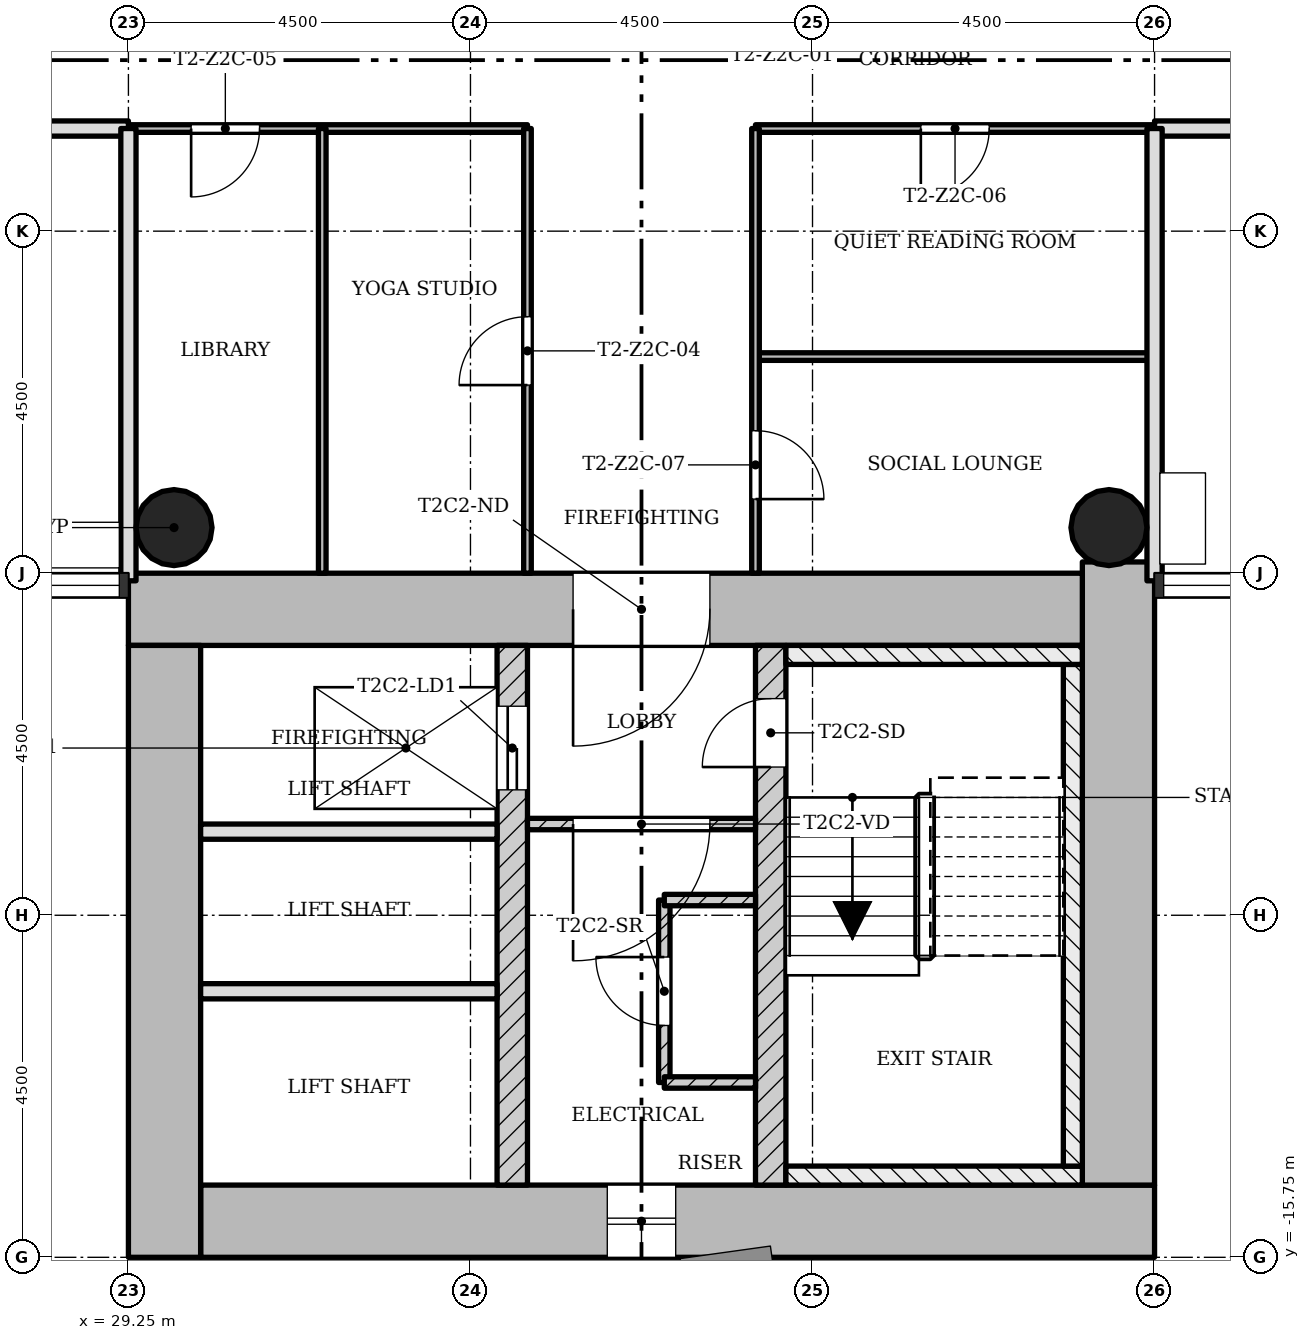
"""IFC4 building model, lengths in metres.
Left out: names, types, materials, properties, quantities, classifications, styles, units other than length and angle.
Written with IfcOpenShell. Run it as: python <this file> out.ifc"""

import sys

from ifc_helpers import new_model, si_unit, direction, frame, frame_2d, origin, origin_2d, place, context, subcontext, project, spatial, rectangle, hollow_circle, extrude, element, fill, save


model = new_model("IFC4")
c1 = context("Model", 3, precision=1e-05, world=origin(), true_north=direction((0.0, 1.0)))
c2 = subcontext(c1, "Body", "Model", "MODEL_VIEW")
j1 = project(units=[si_unit("LENGTHUNIT", "METRE"), si_unit("PLANEANGLEUNIT", "RADIAN")], contexts=[c1])
p1 = place(None, origin())
s1 = spatial("IfcSite", under=j1, at=p1, CompositionType="ELEMENT")
p2 = place(p1, origin())
s2 = spatial("IfcBuilding", under=s1, at=p2, CompositionType="ELEMENT")
p3 = place(p2, frame((0.0, 0.0, 93.6)))
s3 = spatial("IfcBuildingStorey", under=s2, at=p3, CompositionType="ELEMENT", Elevation=93.6)
p4 = place(p3, frame((30.2, -15.275, 0.0), z_axis=(0.0, 0.0, 1.0), x_axis=(1.0, 0.0, 0.0)))
e1 = element("IfcWall", 1, at=p4, inside=s3, PredefinedType="SHEAR", context=c2, shape_type="SweptSolid", body=[
    extrude(rectangle(XDim=12.55, YDim=0.95, at=frame_2d((6.275, 0.0))), origin(), (0.0, 0.0, 1.0), 3.4),
])
p5 = place(p4, frame((5.35, 0.0, 0.45)))
e2 = element("IfcOpeningElement", 2, at=p5, cuts=e1, PredefinedType="OPENING", context=c2, shape_type="SweptSolid", body=[
    extrude(rectangle(XDim=0.9, YDim=2.4, at=frame_2d((0.45, 1.2))), frame((0.0, 0.485, 0.0), z_axis=(0.0, -1.0, 0.0), x_axis=(1.0, 0.0, 0.0)), (0.0, 0.0, 1.0), 0.97),
])
p6 = place(p3, frame((42.275, -14.8, 0.0), z_axis=(0.0, 0.0, 1.0), x_axis=(0.0, 1.0, 0.0)))
e3 = element("IfcWall", 3, at=p6, inside=s3, PredefinedType="SHEAR", context=c2, shape_type="SweptSolid", body=[
    extrude(rectangle(XDim=8.198, YDim=0.95, at=frame_2d((4.099, 0.0))), origin(), (0.0, 0.0, 1.0), 3.4),
])
p7 = place(p3, frame((41.8, -7.225, 0.0), z_axis=(0.0, 0.0, 1.0), x_axis=(-1.0, 0.0, 0.0)))
e4 = element("IfcWall", 4, at=p7, inside=s3, PredefinedType="SHEAR", context=c2, shape_type="SweptSolid", body=[
    extrude(rectangle(XDim=12.55, YDim=0.95, at=frame_2d((6.275, 0.0))), origin(), (0.0, 0.0, 1.0), 3.4),
])
p8 = place(p7, frame((4.9, 0.0, 0.0)))
e5 = element("IfcOpeningElement", 5, at=p8, cuts=e4, PredefinedType="OPENING", context=c2, shape_type="SweptSolid", body=[
    extrude(rectangle(XDim=1.8, YDim=2.1, at=frame_2d((0.9, 1.05))), frame((0.0, 0.485, 0.0), z_axis=(0.0, -1.0, 0.0), x_axis=(1.0, 0.0, 0.0)), (0.0, 0.0, 1.0), 0.97),
])
p9 = place(p3, frame((29.725, -7.7, 0.0), z_axis=(0.0, 0.0, 1.0), x_axis=(0.0, -1.0, 0.0)))
e6 = element("IfcWall", 6, at=p9, inside=s3, PredefinedType="SHEAR", context=c2, shape_type="SweptSolid", body=[
    extrude(rectangle(XDim=8.05, YDim=0.95, at=frame_2d((4.025, 0.0))), origin(), (0.0, 0.0, 1.0), 3.4),
])
p10 = place(p3, frame((34.3, -14.8, 0.0), z_axis=(0.0, 0.0, 1.0), x_axis=(0.0, 1.0, 0.0)))
e7 = element("IfcWall", 7, at=p10, inside=s3, PredefinedType="SHEAR", context=c2, shape_type="SweptSolid", body=[
    extrude(rectangle(XDim=7.1, YDim=0.4, at=frame_2d((3.55, 0.0))), origin(), (0.0, 0.0, 1.0), 3.4),
])
p11 = place(p10, frame((5.2, 0.0, 0.0)))
e8 = element("IfcOpeningElement", 8, at=p11, cuts=e7, PredefinedType="OPENING", context=c2, shape_type="SweptSolid", body=[
    extrude(rectangle(XDim=1.1, YDim=2.1, at=frame_2d((0.55, 1.05))), frame((0.0, 0.21, 0.0), z_axis=(0.0, -1.0, 0.0), x_axis=(1.0, 0.0, 0.0)), (0.0, 0.0, 1.0), 0.42),
])
p12 = place(p3, frame((37.7, -14.8, 0.0), z_axis=(0.0, 0.0, 1.0), x_axis=(0.0, 1.0, 0.0)))
e9 = element("IfcWall", 9, at=p12, inside=s3, PredefinedType="SHEAR", context=c2, shape_type="SweptSolid", body=[
    extrude(rectangle(XDim=7.1, YDim=0.4, at=frame_2d((3.55, 0.0))), origin(), (0.0, 0.0, 1.0), 3.4),
])
p13 = place(p12, frame((5.5, 0.0, 0.0)))
e10 = element("IfcOpeningElement", 10, at=p13, cuts=e9, PredefinedType="OPENING", context=c2, shape_type="SweptSolid", body=[
    extrude(rectangle(XDim=0.9, YDim=2.1, at=frame_2d((0.45, 1.05))), frame((0.0, 0.21, 0.0), z_axis=(0.0, -1.0, 0.0), x_axis=(1.0, 0.0, 0.0)), (0.0, 0.0, 1.0), 0.42),
])
for number, where, z_axis, x_axis in (
    (11, (42.15, -6.15, 0.0), (0.0, 0.0, 1.0), (1.0, 0.0, 0.0)),
    (12, (29.85, -6.15, 0.0), (0.0, 0.0, 1.0), (1.0, 0.0, 0.0)),
):
    element("IfcColumn", number, at=place(p3, frame(where, z_axis=z_axis, x_axis=x_axis)), inside=s3, PredefinedType="COLUMN", context=c2, shape_type="SweptSolid", body=[
        extrude(hollow_circle(Radius=0.5, WallThickness=0.036, at=origin_2d()), origin(), (0.0, 0.0, 1.0), 3.4),
    ])
p14 = place(p3, frame((34.5, -10.05, 0.0), z_axis=(0.0, 0.0, 1.0), x_axis=(1.0, 0.0, 0.0)))
e13 = element("IfcWall", 13, at=p14, inside=s3, PredefinedType="PARTITIONING", context=c2, shape_type="SweptSolid", body=[
    extrude(rectangle(XDim=3.0, YDim=0.15, at=frame_2d((1.5, 0.0))), origin(), (0.0, 0.0, 1.0), 3.0),
])
p15 = place(p14, frame((0.6, 0.0, 0.0)))
e14 = element("IfcOpeningElement", 14, at=p15, cuts=e13, PredefinedType="OPENING", context=c2, shape_type="SweptSolid", body=[
    extrude(rectangle(XDim=1.8, YDim=2.1, at=frame_2d((0.9, 1.05))), frame((0.0, 0.085, 0.0), z_axis=(0.0, -1.0, 0.0), x_axis=(1.0, 0.0, 0.0)), (0.0, 0.0, 1.0), 0.17),
])
for number, where, z_axis, x_axis in (
    (15, (30.2, -10.15, 0.0), (0.0, 0.0, 1.0), (1.0, 0.0, 0.0)),
    (16, (30.2, -12.25, 0.0), (0.0, 0.0, 1.0), (1.0, 0.0, 0.0)),
):
    element("IfcWall", number, at=place(p3, frame(where, z_axis=z_axis, x_axis=x_axis)), inside=s3, PredefinedType="SOLIDWALL", context=c2, shape_type="SweptSolid", body=[
        extrude(rectangle(XDim=3.9, YDim=0.2, at=frame_2d((1.95, 0.0))), origin(), (0.0, 0.0, 1.0), 3.0),
    ])
p16 = place(p3, frame((36.3, -11.05, 0.0), z_axis=(0.0, 0.0, 1.0), x_axis=(0.0, -1.0, 0.0)))
e17 = element("IfcWall", 17, at=p16, inside=s3, PredefinedType="PARTITIONING", context=c2, shape_type="SweptSolid", body=[
    extrude(rectangle(XDim=2.4, YDim=0.15, at=frame_2d((1.2, 0.0))), origin(), (0.0, 0.0, 1.0), 3.0),
])
p17 = place(p16, frame((0.75, 0.0, 0.0)))
e18 = element("IfcOpeningElement", 18, at=p17, cuts=e17, PredefinedType="OPENING", context=c2, shape_type="SweptSolid", body=[
    extrude(rectangle(XDim=0.9, YDim=2.1, at=frame_2d((0.45, 1.05))), frame((0.0, 0.085, 0.0), z_axis=(0.0, -1.0, 0.0), x_axis=(1.0, 0.0, 0.0)), (0.0, 0.0, 1.0), 0.17),
])
for number, where, z_axis, x_axis in (
    (19, (36.3, -11.05, 0.0), (0.0, 0.0, 1.0), (1.0, 0.0, 0.0)),
    (20, (36.3, -13.45, 0.0), (0.0, 0.0, 1.0), (1.0, 0.0, 0.0)),
):
    element("IfcWall", number, at=place(p3, frame(where, z_axis=z_axis, x_axis=x_axis)), inside=s3, PredefinedType="PARTITIONING", context=c2, shape_type="SweptSolid", body=[
        extrude(rectangle(XDim=1.2, YDim=0.15, at=frame_2d((0.6, 0.0))), origin(), (0.0, 0.0, 1.0), 3.0),
    ])
p18 = place(p3, frame((42.75, -3.9, 0.0), z_axis=(0.0, 0.0, 1.0), x_axis=(-1.0, 0.0, 0.0)))
e21 = element("IfcWall", 21, at=p18, inside=s3, PredefinedType="PARTITIONING", context=c2, shape_type="SweptSolid", body=[
    extrude(rectangle(XDim=5.25, YDim=0.1, at=frame_2d((2.625, 0.0))), origin(), (0.0, 0.0, 1.0), 3.0),
])
p19 = place(p3, frame((42.75, -0.9, 0.0), z_axis=(0.0, 0.0, 1.0), x_axis=(-1.0, 0.0, 0.0)))
e22 = element("IfcWall", 22, at=p19, inside=s3, PredefinedType="PARTITIONING", context=c2, shape_type="SweptSolid", body=[
    extrude(rectangle(XDim=5.25, YDim=0.1, at=frame_2d((2.625, 0.0))), origin(), (0.0, 0.0, 1.0), 3.0),
])
p20 = place(p19, frame((2.175, 0.0, 0.0)))
e23 = element("IfcOpeningElement", 23, at=p20, cuts=e22, PredefinedType="OPENING", context=c2, shape_type="SweptSolid", body=[
    extrude(rectangle(XDim=0.9, YDim=2.1, at=frame_2d((0.45, 1.05))), frame((0.0, 0.06, 0.0), z_axis=(0.0, -1.0, 0.0), x_axis=(1.0, 0.0, 0.0)), (0.0, 0.0, 1.0), 0.12),
])
p21 = place(p3, frame((34.5, -0.9, 0.0), z_axis=(0.0, 0.0, 1.0), x_axis=(-1.0, 0.0, 0.0)))
e24 = element("IfcWall", 24, at=p21, inside=s3, PredefinedType="PARTITIONING", context=c2, shape_type="SweptSolid", body=[
    extrude(rectangle(XDim=5.25, YDim=0.1, at=frame_2d((2.625, 0.0))), origin(), (0.0, 0.0, 1.0), 3.0),
])
p22 = place(p21, frame((3.525, 0.0, 0.0)))
e25 = element("IfcOpeningElement", 25, at=p22, cuts=e24, PredefinedType="OPENING", context=c2, shape_type="SweptSolid", body=[
    extrude(rectangle(XDim=0.9, YDim=2.1, at=frame_2d((0.45, 1.05))), frame((0.0, 0.06, 0.0), z_axis=(0.0, -1.0, 0.0), x_axis=(1.0, 0.0, 0.0)), (0.0, 0.0, 1.0), 0.12),
])
p23 = place(p3, frame((51.75, -0.9, 0.0), z_axis=(0.0, 0.0, 1.0), x_axis=(-1.0, 0.0, 0.0)))
e26 = element("IfcWall", 26, at=p23, inside=s3, PredefinedType="SOLIDWALL", context=c2, shape_type="SweptSolid", body=[
    extrude(rectangle(XDim=9.0, YDim=0.2, at=frame_2d((4.5, 0.0))), origin(), (0.0, 0.0, 1.0), 3.0),
])
p24 = place(p23, frame((1.95, 0.0, 0.0)))
e27 = element("IfcOpeningElement", 27, at=p24, cuts=e26, PredefinedType="OPENING", context=c2, shape_type="SweptSolid", body=[
    extrude(rectangle(XDim=0.9, YDim=2.1, at=frame_2d((0.45, 1.05))), frame((0.0, 0.11, 0.0), z_axis=(0.0, -1.0, 0.0), x_axis=(1.0, 0.0, 0.0)), (0.0, 0.0, 1.0), 0.22),
])
p25 = place(p3, frame((29.25, -0.9, 0.0), z_axis=(0.0, 0.0, 1.0), x_axis=(-1.0, 0.0, 0.0)))
e28 = element("IfcWall", 28, at=p25, inside=s3, PredefinedType="SOLIDWALL", context=c2, shape_type="SweptSolid", body=[
    extrude(rectangle(XDim=1.8, YDim=0.2, at=frame_2d((0.9, 0.0))), origin(), (0.0, 0.0, 1.0), 3.0),
])
p26 = place(p3, frame((42.75, -6.85, 0.0), z_axis=(0.0, 0.0, 1.0), x_axis=(0.0, 1.0, 0.0)))
e29 = element("IfcWall", 29, at=p26, inside=s3, PredefinedType="SOLIDWALL", context=c2, shape_type="SweptSolid", body=[
    extrude(rectangle(XDim=5.95, YDim=0.2, at=frame_2d((2.975, 0.0))), origin(), (0.0, 0.0, 1.0), 3.0),
])
p27 = place(p3, frame((37.5, -6.75, 0.0), z_axis=(0.0, 0.0, 1.0), x_axis=(0.0, 1.0, 0.0)))
e30 = element("IfcWall", 30, at=p27, inside=s3, PredefinedType="PARTITIONING", context=c2, shape_type="SweptSolid", body=[
    extrude(rectangle(XDim=5.85, YDim=0.1, at=frame_2d((2.925, 0.0))), origin(), (0.0, 0.0, 1.0), 3.0),
])
p28 = place(p27, frame((0.975, 0.0, 0.0)))
e31 = element("IfcOpeningElement", 31, at=p28, cuts=e30, PredefinedType="OPENING", context=c2, shape_type="SweptSolid", body=[
    extrude(rectangle(XDim=0.9, YDim=2.1, at=frame_2d((0.45, 1.05))), frame((0.0, 0.06, 0.0), z_axis=(0.0, -1.0, 0.0), x_axis=(1.0, 0.0, 0.0)), (0.0, 0.0, 1.0), 0.12),
])
p29 = place(p3, frame((34.5, -6.75, 0.0), z_axis=(0.0, 0.0, 1.0), x_axis=(0.0, 1.0, 0.0)))
e32 = element("IfcWall", 32, at=p29, inside=s3, PredefinedType="PARTITIONING", context=c2, shape_type="SweptSolid", body=[
    extrude(rectangle(XDim=5.85, YDim=0.1, at=frame_2d((2.925, 0.0))), origin(), (0.0, 0.0, 1.0), 3.0),
])
p30 = place(p29, frame((2.475, 0.0, 0.0)))
e33 = element("IfcOpeningElement", 33, at=p30, cuts=e32, PredefinedType="OPENING", context=c2, shape_type="SweptSolid", body=[
    extrude(rectangle(XDim=0.9, YDim=2.1, at=frame_2d((0.45, 1.05))), frame((0.0, 0.06, 0.0), z_axis=(0.0, -1.0, 0.0), x_axis=(1.0, 0.0, 0.0)), (0.0, 0.0, 1.0), 0.12),
])
p31 = place(p3, frame((31.8, -6.75, 0.0), z_axis=(0.0, 0.0, 1.0), x_axis=(0.0, 1.0, 0.0)))
e34 = element("IfcWall", 34, at=p31, inside=s3, PredefinedType="PARTITIONING", context=c2, shape_type="SweptSolid", body=[
    extrude(rectangle(XDim=5.85, YDim=0.1, at=frame_2d((2.925, 0.0))), origin(), (0.0, 0.0, 1.0), 3.0),
])
p32 = place(p3, frame((29.25, -6.85, 0.0), z_axis=(0.0, 0.0, 1.0), x_axis=(0.0, 1.0, 0.0)))
e35 = element("IfcWall", 35, at=p32, inside=s3, PredefinedType="SOLIDWALL", context=c2, shape_type="SweptSolid", body=[
    extrude(rectangle(XDim=5.95, YDim=0.2, at=frame_2d((2.975, 0.0))), origin(), (0.0, 0.0, 1.0), 3.0),
])
p33 = place(p3, frame((37.9, -14.675, 0.0), z_axis=(0.0, 0.0, 1.0), x_axis=(1.0, 0.0, 0.0)))
e36 = element("IfcWall", 36, at=p33, inside=s3, PredefinedType="SHEAR", context=c2, shape_type="SweptSolid", body=[
    extrude(rectangle(XDim=3.9, YDim=0.25, at=frame_2d((1.95, 0.0))), origin(), (0.0, 0.0, 1.0), 3.4),
])
p34 = place(p3, frame((41.675, -7.95, 0.0), z_axis=(0.0, 0.0, 1.0), x_axis=(0.0, -1.0, 0.0)))
e37 = element("IfcWall", 37, at=p34, inside=s3, PredefinedType="SHEAR", context=c2, shape_type="SweptSolid", body=[
    extrude(rectangle(XDim=6.6, YDim=0.25, at=frame_2d((3.3, 0.0))), origin(), (0.0, 0.0, 1.0), 3.4),
])
p35 = place(p3, frame((37.9, -7.825, 0.0), z_axis=(0.0, 0.0, 1.0), x_axis=(1.0, 0.0, 0.0)))
e38 = element("IfcWall", 38, at=p35, inside=s3, PredefinedType="SHEAR", context=c2, shape_type="SweptSolid", body=[
    extrude(rectangle(XDim=3.9, YDim=0.25, at=frame_2d((1.95, 0.0))), origin(), (0.0, 0.0, 1.0), 3.4),
])
p36 = place(p5, origin())
e39 = element("IfcWindow", 39, at=p36, inside=s3, PartitioningType="SINGLE_PANEL", PredefinedType="WINDOW", context=c2, shape_type="SweptSolid", body=[
    extrude(rectangle(XDim=0.9, YDim=2.4, at=frame_2d((0.45, 1.2))), frame((0.0, 0.03, 0.0), z_axis=(0.0, -1.0, 0.0), x_axis=(1.0, 0.0, 0.0)), (0.0, 0.0, 1.0), 0.06),
])
fill(e2, e39)
p37 = place(p15, origin())
e40 = element("IfcDoor", 40, at=p37, inside=s3, OperationType="SINGLE_SWING_LEFT", PredefinedType="DOOR", context=c2, shape_type="SweptSolid", body=[
    extrude(rectangle(XDim=1.8, YDim=2.1, at=frame_2d((0.9, 1.05))), frame((0.0, 0.025, 0.0), z_axis=(0.0, -1.0, 0.0), x_axis=(1.0, 0.0, 0.0)), (0.0, 0.0, 1.0), 0.05),
])
fill(e14, e40)
p38 = place(p17, origin())
e41 = element("IfcDoor", 41, at=p38, inside=s3, OperationType="SINGLE_SWING_LEFT", PredefinedType="DOOR", context=c2, shape_type="SweptSolid", body=[
    extrude(rectangle(XDim=0.9, YDim=2.1, at=frame_2d((0.45, 1.05))), frame((0.0, 0.025, 0.0), z_axis=(0.0, -1.0, 0.0), x_axis=(1.0, 0.0, 0.0)), (0.0, 0.0, 1.0), 0.05),
])
fill(e18, e41)
p39 = place(p30, origin())
e42 = element("IfcDoor", 42, at=p39, inside=s3, OperationType="SINGLE_SWING_RIGHT", PredefinedType="DOOR", context=c2, shape_type="SweptSolid", body=[
    extrude(rectangle(XDim=0.9, YDim=2.1, at=frame_2d((0.45, 1.05))), frame((0.0, 0.025, 0.0), z_axis=(0.0, -1.0, 0.0), x_axis=(1.0, 0.0, 0.0)), (0.0, 0.0, 1.0), 0.05),
])
fill(e33, e42)
p40 = place(p22, origin())
e43 = element("IfcDoor", 43, at=p40, inside=s3, OperationType="SINGLE_SWING_LEFT", PredefinedType="DOOR", context=c2, shape_type="SweptSolid", body=[
    extrude(rectangle(XDim=0.9, YDim=2.1, at=frame_2d((0.45, 1.05))), frame((0.0, 0.025, 0.0), z_axis=(0.0, -1.0, 0.0), x_axis=(1.0, 0.0, 0.0)), (0.0, 0.0, 1.0), 0.05),
])
fill(e25, e43)
p41 = place(p20, origin())
e44 = element("IfcDoor", 44, at=p41, inside=s3, OperationType="SINGLE_SWING_LEFT", PredefinedType="DOOR", context=c2, shape_type="SweptSolid", body=[
    extrude(rectangle(XDim=0.9, YDim=2.1, at=frame_2d((0.45, 1.05))), frame((0.0, 0.025, 0.0), z_axis=(0.0, -1.0, 0.0), x_axis=(1.0, 0.0, 0.0)), (0.0, 0.0, 1.0), 0.05),
])
fill(e23, e44)
p42 = place(p28, origin())
e45 = element("IfcDoor", 45, at=p42, inside=s3, OperationType="SINGLE_SWING_LEFT", PredefinedType="DOOR", context=c2, shape_type="SweptSolid", body=[
    extrude(rectangle(XDim=0.9, YDim=2.1, at=frame_2d((0.45, 1.05))), frame((0.0, 0.025, 0.0), z_axis=(0.0, -1.0, 0.0), x_axis=(1.0, 0.0, 0.0)), (0.0, 0.0, 1.0), 0.05),
])
fill(e31, e45)
p43 = place(p13, origin())
e46 = element("IfcDoor", 46, at=p43, inside=s3, OperationType="SINGLE_SWING_RIGHT", PredefinedType="DOOR", context=c2, shape_type="SweptSolid", body=[
    extrude(rectangle(XDim=0.9, YDim=2.1, at=frame_2d((0.45, 1.05))), frame((0.0, 0.025, 0.0), z_axis=(0.0, -1.0, 0.0), x_axis=(1.0, 0.0, 0.0)), (0.0, 0.0, 1.0), 0.05),
])
fill(e10, e46)
p44 = place(p11, origin())
e47 = element("IfcDoor", 47, at=p44, inside=s3, OperationType="SLIDING_TO_LEFT", PredefinedType="DOOR", context=c2, shape_type="SweptSolid", body=[
    extrude(rectangle(XDim=1.1, YDim=2.1, at=frame_2d((0.55, 1.05))), frame((0.0, 0.025, 0.0), z_axis=(0.0, -1.0, 0.0), x_axis=(1.0, 0.0, 0.0)), (0.0, 0.0, 1.0), 0.05),
])
fill(e8, e47)
p45 = place(p8, origin())
e48 = element("IfcDoor", 48, at=p45, inside=s3, OperationType="SINGLE_SWING_LEFT", PredefinedType="DOOR", context=c2, shape_type="SweptSolid", body=[
    extrude(rectangle(XDim=1.8, YDim=2.1, at=frame_2d((0.9, 1.05))), frame((0.0, 0.025, 0.0), z_axis=(0.0, -1.0, 0.0), x_axis=(1.0, 0.0, 0.0)), (0.0, 0.0, 1.0), 0.05),
])
fill(e5, e48)
save(model, sys.argv[1])
